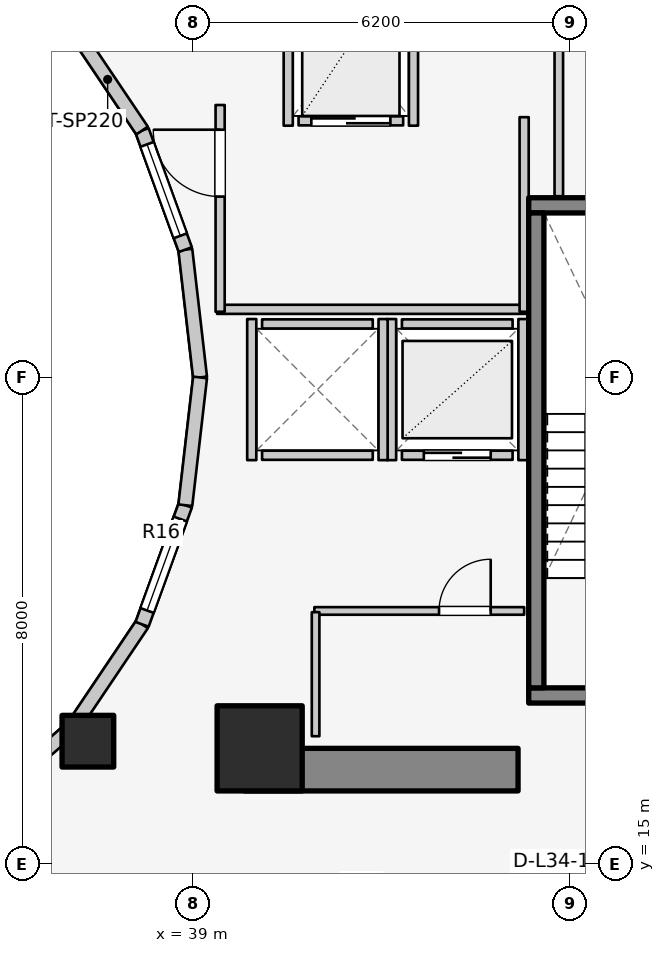
"""IFC4 building model, lengths in metres.
Left out: names, types, materials, properties, quantities, classifications, styles, units other than length and angle.
Written with IfcOpenShell. Run it as: python <this file> out.ifc"""

import sys

from ifc_helpers import new_model, si_unit, direction, frame, frame_2d, origin, origin_2d, place, context, subcontext, project, spatial, rectangle, extrude, element, fill, save


model = new_model("IFC4")
c1 = context("Model", 3, precision=1e-05, world=origin(), true_north=direction((0.0, 1.0)))
c2 = subcontext(c1, "Body", "Model", "MODEL_VIEW")
j1 = project(units=[si_unit("LENGTHUNIT", "METRE"), si_unit("PLANEANGLEUNIT", "RADIAN")], contexts=[c1])
p1 = place(None, origin())
s1 = spatial("IfcSite", under=j1, at=p1, CompositionType="ELEMENT")
p2 = place(p1, origin())
s2 = spatial("IfcBuilding", under=s1, at=p2, CompositionType="ELEMENT")
p3 = place(p2, frame((0.0, 0.0, 113.5)))
s3 = spatial("IfcBuildingStorey", under=s2, at=p3, CompositionType="ELEMENT", Elevation=113.5)
p4 = place(p3, frame((39.85, 16.55, 0.0), z_axis=(0.0, 0.0, 1.0), x_axis=(1.0, 0.0, 0.0)))
e1 = element("IfcWall", 1, at=p4, inside=s3, PredefinedType="SHEAR", context=c2, shape_type="SweptSolid", body=[
    extrude(rectangle(XDim=4.5, YDim=0.7, at=frame_2d((2.25, 0.0))), origin(), (0.0, 0.0, 1.0), 3.1),
])
p5 = place(p3, frame((44.525, 17.77, 0.0), z_axis=(0.0, 0.0, 1.0), x_axis=(1.0, 0.0, 0.0)))
e2 = element("IfcWall", 2, at=p5, inside=s3, PredefinedType="SOLIDWALL", context=c2, shape_type="SweptSolid", body=[
    extrude(rectangle(XDim=3.37, YDim=0.25, at=frame_2d((1.685, 0.0))), origin(), (0.0, 0.0, 1.0), 3.1),
])
p6 = place(p5, frame((1.135, 0.0, 0.0)))
e3 = element("IfcOpeningElement", 3, at=p6, cuts=e2, PredefinedType="OPENING", context=c2, shape_type="SweptSolid", body=[
    extrude(rectangle(XDim=1.1, YDim=2.1, at=frame_2d((0.55, 1.05))), frame((0.0, 0.135, 0.0), z_axis=(0.0, -1.0, 0.0), x_axis=(1.0, 0.0, 0.0)), (0.0, 0.0, 1.0), 0.27),
])
p7 = place(p3, frame((44.525, 25.83, 0.0), z_axis=(0.0, 0.0, 1.0), x_axis=(1.0, 0.0, 0.0)))
e4 = element("IfcWall", 4, at=p7, inside=s3, PredefinedType="SOLIDWALL", context=c2, shape_type="SweptSolid", body=[
    extrude(rectangle(XDim=3.37, YDim=0.25, at=frame_2d((1.685, 0.0))), origin(), (0.0, 0.0, 1.0), 3.1),
])
p8 = place(p3, frame((44.65, 17.895, 0.0), z_axis=(0.0, 0.0, 1.0), x_axis=(0.0, 1.0, 0.0)))
e5 = element("IfcWall", 5, at=p8, inside=s3, PredefinedType="SOLIDWALL", context=c2, shape_type="SweptSolid", body=[
    extrude(rectangle(XDim=7.81, YDim=0.25, at=frame_2d((3.905, 0.0))), origin(), (0.0, 0.0, 1.0), 3.1),
])
p9 = place(p3, frame((40.1, 16.9, 0.0), z_axis=(0.0, 0.0, 1.0), x_axis=(1.0, 0.0, 0.0)))
e6 = element("IfcColumn", 6, at=p9, inside=s3, PredefinedType="COLUMN", context=c2, shape_type="SweptSolid", body=[
    extrude(rectangle(XDim=1.4, YDim=1.4, at=origin_2d()), origin(), (0.0, 0.0, 1.0), 3.1),
])
p10 = place(p3, frame((37.275, 17.018, 0.0), z_axis=(0.0, 0.0, 1.0), x_axis=(1.0, 0.0, 0.0)))
e7 = element("IfcColumn", 7, at=p10, inside=s3, PredefinedType="COLUMN", context=c2, shape_type="SweptSolid", body=[
    extrude(rectangle(XDim=0.85, YDim=0.85, at=origin_2d()), origin(), (0.0, 0.0, 1.0), 3.1),
])
p11 = place(p3, frame((39.12, 23.0, 0.0), z_axis=(0.0, 0.0, 1.0), x_axis=(-0.114711713601, 0.993398823617, 0.0)))
e8 = element("IfcWall", 8, at=p11, inside=s3, PredefinedType="STANDARD", context=c2, shape_type="SweptSolid", body=[
    extrude(rectangle(XDim=2.115, YDim=0.23, at=frame_2d((1.058, 0.0))), origin(), (0.0, 0.0, 1.0), 2.84),
])
p12 = place(p3, frame((38.877, 25.102, 0.0), z_axis=(0.0, 0.0, 1.0), x_axis=(-0.341423187295, 0.93990968033, 0.0)))
e9 = element("IfcWall", 9, at=p12, inside=s3, PredefinedType="STANDARD", context=c2, shape_type="SweptSolid", body=[
    extrude(rectangle(XDim=2.084, YDim=0.23, at=frame_2d((1.042, 0.0))), origin(), (0.0, 0.0, 1.0), 2.84),
])
p13 = place(p12, frame((0.242, 0.0, 0.85)))
e10 = element("IfcOpeningElement", 10, at=p13, cuts=e9, PredefinedType="OPENING", context=c2, shape_type="SweptSolid", body=[
    extrude(rectangle(XDim=1.6, YDim=1.65, at=frame_2d((0.8, 0.825))), frame((0.0, 0.125, 0.0), z_axis=(0.0, -1.0, 0.0), x_axis=(1.0, 0.0, 0.0)), (0.0, 0.0, 1.0), 0.25),
])
p14 = place(p3, frame((38.166, 27.06, 0.0), z_axis=(0.0, 0.0, 1.0), x_axis=(-0.558197800898, 0.829707909492, 0.0)))
e11 = element("IfcWall", 11, at=p14, inside=s3, PredefinedType="STANDARD", context=c2, shape_type="SweptSolid", body=[
    extrude(rectangle(XDim=2.027, YDim=0.23, at=frame_2d((1.013, 0.0))), origin(), (0.0, 0.0, 1.0), 2.16),
])
p15 = place(p3, frame((35.56, 15.968, 0.0), z_axis=(0.0, 0.0, 1.0), x_axis=(0.752576694707, 0.658504607869, 0.0)))
e12 = element("IfcWall", 12, at=p15, inside=s3, PredefinedType="STANDARD", context=c2, shape_type="SweptSolid", body=[
    extrude(rectangle(XDim=1.959, YDim=0.23, at=frame_2d((0.98, 0.0))), origin(), (0.0, 0.0, 1.0), 2.16),
])
p16 = place(p3, frame((37.035, 17.258, 0.0), z_axis=(0.0, 0.0, 1.0), x_axis=(0.558197800898, 0.829707909492, 0.0)))
e13 = element("IfcWall", 13, at=p16, inside=s3, PredefinedType="STANDARD", context=c2, shape_type="SweptSolid", body=[
    extrude(rectangle(XDim=2.027, YDim=0.23, at=frame_2d((1.013, 0.0))), origin(), (0.0, 0.0, 1.0), 2.16),
])
p17 = place(p3, frame((38.166, 18.94, 0.0), z_axis=(0.0, 0.0, 1.0), x_axis=(0.341423187295, 0.93990968033, 0.0)))
e14 = element("IfcWall", 14, at=p17, inside=s3, PredefinedType="STANDARD", context=c2, shape_type="SweptSolid", body=[
    extrude(rectangle(XDim=2.084, YDim=0.23, at=frame_2d((1.042, 0.0))), origin(), (0.0, 0.0, 1.0), 2.84),
])
p18 = place(p17, frame((0.242, 0.0, 0.85)))
e15 = element("IfcOpeningElement", 15, at=p18, cuts=e14, PredefinedType="OPENING", context=c2, shape_type="SweptSolid", body=[
    extrude(rectangle(XDim=1.6, YDim=1.65, at=frame_2d((0.8, 0.825))), frame((0.0, 0.125, 0.0), z_axis=(0.0, -1.0, 0.0), x_axis=(1.0, 0.0, 0.0)), (0.0, 0.0, 1.0), 0.25),
])
p19 = place(p3, frame((38.877, 20.898, 0.0), z_axis=(0.0, 0.0, 1.0), x_axis=(0.114711713601, 0.993398823617, 0.0)))
e16 = element("IfcWall", 16, at=p19, inside=s3, PredefinedType="STANDARD", context=c2, shape_type="SweptSolid", body=[
    extrude(rectangle(XDim=2.115, YDim=0.23, at=frame_2d((1.058, 0.0))), origin(), (0.0, 0.0, 1.0), 2.84),
])
p20 = place(p3, frame((42.44, 21.72, 0.0), z_axis=(0.0, 0.0, 1.0), x_axis=(1.0, 0.0, 0.0)))
e17 = element("IfcWall", 17, at=p20, inside=s3, PredefinedType="SOLIDWALL", context=c2, shape_type="SweptSolid", body=[
    extrude(rectangle(XDim=1.82, YDim=0.15, at=frame_2d((0.91, 0.0))), origin(), (0.0, 0.0, 1.0), 2.855),
])
p21 = place(p20, frame((0.36, 0.0, 0.0)))
e18 = element("IfcOpeningElement", 18, at=p21, cuts=e17, PredefinedType="OPENING", context=c2, shape_type="SweptSolid", body=[
    extrude(rectangle(XDim=1.1, YDim=2.1, at=frame_2d((0.55, 1.05))), frame((0.0, 0.085, 0.0), z_axis=(0.0, -1.0, 0.0), x_axis=(1.0, 0.0, 0.0)), (0.0, 0.0, 1.0), 0.17),
])
p22 = place(p3, frame((42.44, 23.88, 0.0), z_axis=(0.0, 0.0, 1.0), x_axis=(1.0, 0.0, 0.0)))
e19 = element("IfcWall", 19, at=p22, inside=s3, PredefinedType="SOLIDWALL", context=c2, shape_type="SweptSolid", body=[
    extrude(rectangle(XDim=1.82, YDim=0.15, at=frame_2d((0.91, 0.0))), origin(), (0.0, 0.0, 1.0), 2.855),
])
for number, where, z_axis, x_axis in (
    (20, (42.27, 21.64, 0.0), (0.0, 0.0, 1.0), (0.0, 1.0, 0.0)),
    (21, (44.43, 21.64, 0.0), (0.0, 0.0, 1.0), (0.0, 1.0, 0.0)),
):
    element("IfcWall", number, at=place(p3, frame(where, z_axis=z_axis, x_axis=x_axis)), inside=s3, PredefinedType="SOLIDWALL", context=c2, shape_type="SweptSolid", body=[
        extrude(rectangle(XDim=2.32, YDim=0.15, at=frame_2d((1.16, 0.0))), origin(), (0.0, 0.0, 1.0), 2.855),
    ])
for number, where, z_axis, x_axis in (
    (22, (40.14, 21.72, 0.0), (0.0, 0.0, 1.0), (1.0, 0.0, 0.0)),
    (23, (40.14, 23.88, 0.0), (0.0, 0.0, 1.0), (1.0, 0.0, 0.0)),
):
    element("IfcWall", number, at=place(p3, frame(where, z_axis=z_axis, x_axis=x_axis)), inside=s3, PredefinedType="SOLIDWALL", context=c2, shape_type="SweptSolid", body=[
        extrude(rectangle(XDim=1.82, YDim=0.15, at=frame_2d((0.91, 0.0))), origin(), (0.0, 0.0, 1.0), 2.12),
    ])
p23 = place(p3, frame((39.97, 21.64, 0.0), z_axis=(0.0, 0.0, 1.0), x_axis=(0.0, 1.0, 0.0)))
e24 = element("IfcWall", 24, at=p23, inside=s3, PredefinedType="SOLIDWALL", context=c2, shape_type="SweptSolid", body=[
    extrude(rectangle(XDim=2.32, YDim=0.15, at=frame_2d((1.16, 0.0))), origin(), (0.0, 0.0, 1.0), 2.12),
])
p24 = place(p3, frame((42.13, 21.64, 0.0), z_axis=(0.0, 0.0, 1.0), x_axis=(0.0, 1.0, 0.0)))
e25 = element("IfcWall", 25, at=p24, inside=s3, PredefinedType="SOLIDWALL", context=c2, shape_type="SweptSolid", body=[
    extrude(rectangle(XDim=2.32, YDim=0.15, at=frame_2d((1.16, 0.0))), origin(), (0.0, 0.0, 1.0), 2.855),
])
p25 = place(p3, frame((40.74, 27.22, 0.0), z_axis=(0.0, 0.0, 1.0), x_axis=(1.0, 0.0, 0.0)))
e26 = element("IfcWall", 26, at=p25, inside=s3, PredefinedType="SOLIDWALL", context=c2, shape_type="SweptSolid", body=[
    extrude(rectangle(XDim=1.72, YDim=0.15, at=frame_2d((0.86, 0.0))), origin(), (0.0, 0.0, 1.0), 2.855),
])
p26 = place(p25, frame((0.21, 0.0, 0.0)))
e27 = element("IfcOpeningElement", 27, at=p26, cuts=e26, PredefinedType="OPENING", context=c2, shape_type="SweptSolid", body=[
    extrude(rectangle(XDim=1.3, YDim=2.1, at=frame_2d((0.65, 1.05))), frame((0.0, 0.085, 0.0), z_axis=(0.0, -1.0, 0.0), x_axis=(1.0, 0.0, 0.0)), (0.0, 0.0, 1.0), 0.17),
])
for number, where, z_axis, x_axis in (
    (28, (40.57, 27.14, 0.0), (0.0, 0.0, 1.0), (0.0, 1.0, 0.0)),
    (29, (42.63, 27.14, 0.0), (0.0, 0.0, 1.0), (0.0, 1.0, 0.0)),
):
    element("IfcWall", number, at=place(p3, frame(where, z_axis=z_axis, x_axis=x_axis)), inside=s3, PredefinedType="SOLIDWALL", context=c2, shape_type="SweptSolid", body=[
        extrude(rectangle(XDim=2.72, YDim=0.15, at=frame_2d((1.36, 0.0))), origin(), (0.0, 0.0, 1.0), 2.855),
    ])
p27 = place(p3, frame((39.4, 24.12, 0.0), z_axis=(0.0, 0.0, 1.0), x_axis=(1.0, 0.0, 0.0)))
e30 = element("IfcWall", 30, at=p27, inside=s3, PredefinedType="PARTITIONING", context=c2, shape_type="SweptSolid", body=[
    extrude(rectangle(XDim=5.08, YDim=0.15, at=frame_2d((2.54, 0.0))), origin(), (0.0, 0.0, 1.0), 2.12),
])
p28 = place(p3, frame((44.45, 24.08, 0.0), z_axis=(0.0, 0.0, 1.0), x_axis=(0.0, 1.0, 0.0)))
e31 = element("IfcWall", 31, at=p28, inside=s3, PredefinedType="PARTITIONING", context=c2, shape_type="SweptSolid", body=[
    extrude(rectangle(XDim=3.2, YDim=0.15, at=frame_2d((1.6, 0.0))), origin(), (0.0, 0.0, 1.0), 2.855),
])
p29 = place(p3, frame((39.45, 24.08, 0.0), z_axis=(0.0, 0.0, 1.0), x_axis=(0.0, 1.0, 0.0)))
e32 = element("IfcWall", 32, at=p29, inside=s3, PredefinedType="PARTITIONING", context=c2, shape_type="SweptSolid", body=[
    extrude(rectangle(XDim=3.4, YDim=0.15, at=frame_2d((1.7, 0.0))), origin(), (0.0, 0.0, 1.0), 2.855),
])
p30 = place(p29, frame((1.894, 0.0, 0.0)))
e33 = element("IfcOpeningElement", 33, at=p30, cuts=e32, PredefinedType="OPENING", context=c2, shape_type="SweptSolid", body=[
    extrude(rectangle(XDim=1.1, YDim=2.1, at=frame_2d((0.55, 1.05))), frame((0.0, 0.085, 0.0), z_axis=(0.0, -1.0, 0.0), x_axis=(1.0, 0.0, 0.0)), (0.0, 0.0, 1.0), 0.17),
])
p31 = place(p3, frame((41.0, 19.16, 0.0), z_axis=(0.0, 0.0, 1.0), x_axis=(1.0, 0.0, 0.0)))
e34 = element("IfcWall", 34, at=p31, inside=s3, PredefinedType="PARTITIONING", context=c2, shape_type="SweptSolid", body=[
    extrude(rectangle(XDim=3.45, YDim=0.125, at=frame_2d((1.725, 0.0))), origin(), (0.0, 0.0, 1.0), 2.12),
])
p32 = place(p31, frame((2.05, 0.0, 0.0)))
e35 = element("IfcOpeningElement", 35, at=p32, cuts=e34, PredefinedType="OPENING", context=c2, shape_type="SweptSolid", body=[
    extrude(rectangle(XDim=0.85, YDim=2.05, at=frame_2d((0.425, 1.025))), frame((0.0, 0.073, 0.0), z_axis=(0.0, -1.0, 0.0), x_axis=(1.0, 0.0, 0.0)), (0.0, 0.0, 1.0), 0.145),
])
p33 = place(p3, frame((41.02, 17.1, 0.0), z_axis=(0.0, 0.0, 1.0), x_axis=(0.0, 1.0, 0.0)))
e36 = element("IfcWall", 36, at=p33, inside=s3, PredefinedType="PARTITIONING", context=c2, shape_type="SweptSolid", body=[
    extrude(rectangle(XDim=2.04, YDim=0.125, at=frame_2d((1.02, 0.0))), origin(), (0.0, 0.0, 1.0), 2.855),
])
p34 = place(p3, frame((45.02, 25.98, 0.0), z_axis=(0.0, 0.0, 1.0), x_axis=(0.0, 1.0, 0.0)))
e37 = element("IfcWall", 37, at=p34, inside=s3, PredefinedType="PLUMBINGWALL", context=c2, shape_type="SweptSolid", body=[
    extrude(rectangle(XDim=3.88, YDim=0.14, at=frame_2d((1.94, 0.0))), origin(), (0.0, 0.0, 1.0), 2.855),
])
p35 = place(p3, frame((35.55, 15.985, 0.0), z_axis=(0.0, 0.0, 1.0), x_axis=(0.525627246902, -0.850714991824, 0.0)))
e38 = element("IfcWall", 38, at=p35, inside=s3, PredefinedType="PARTITIONING", context=c2, shape_type="SweptSolid", body=[
    extrude(rectangle(XDim=2.901, YDim=0.125, at=frame_2d((1.451, 0.0))), origin(), (0.0, 0.0, 1.0), 2.272),
])
p36 = place(p13, origin())
e39 = element("IfcWindow", 39, at=p36, inside=s3, PartitioningType="SINGLE_PANEL", PredefinedType="WINDOW", context=c2, shape_type="SweptSolid", body=[
    extrude(rectangle(XDim=1.6, YDim=1.65, at=frame_2d((0.8, 0.825))), frame((0.0, 0.03, 0.0), z_axis=(0.0, -1.0, 0.0), x_axis=(1.0, 0.0, 0.0)), (0.0, 0.0, 1.0), 0.06),
])
fill(e10, e39)
p37 = place(p18, origin())
e40 = element("IfcWindow", 40, at=p37, inside=s3, PartitioningType="SINGLE_PANEL", PredefinedType="WINDOW", context=c2, shape_type="SweptSolid", body=[
    extrude(rectangle(XDim=1.6, YDim=1.65, at=frame_2d((0.8, 0.825))), frame((0.0, 0.03, 0.0), z_axis=(0.0, -1.0, 0.0), x_axis=(1.0, 0.0, 0.0)), (0.0, 0.0, 1.0), 0.06),
])
fill(e15, e40)
p38 = place(p21, origin())
e41 = element("IfcDoor", 41, at=p38, inside=s3, OperationType="DOUBLE_DOOR_SLIDING", PredefinedType="DOOR", context=c2, shape_type="SweptSolid", body=[
    extrude(rectangle(XDim=1.1, YDim=2.1, at=frame_2d((0.55, 1.05))), frame((0.0, 0.025, 0.0), z_axis=(0.0, -1.0, 0.0), x_axis=(1.0, 0.0, 0.0)), (0.0, 0.0, 1.0), 0.05),
])
fill(e18, e41)
p39 = place(p26, origin())
e42 = element("IfcDoor", 42, at=p39, inside=s3, OperationType="DOUBLE_DOOR_SLIDING", PredefinedType="DOOR", context=c2, shape_type="SweptSolid", body=[
    extrude(rectangle(XDim=1.3, YDim=2.1, at=frame_2d((0.65, 1.05))), frame((0.0, 0.025, 0.0), z_axis=(0.0, -1.0, 0.0), x_axis=(1.0, 0.0, 0.0)), (0.0, 0.0, 1.0), 0.05),
])
fill(e27, e42)
p40 = place(p30, origin())
e43 = element("IfcDoor", 43, at=p40, inside=s3, OperationType="SINGLE_SWING_RIGHT", PredefinedType="DOOR", context=c2, shape_type="SweptSolid", body=[
    extrude(rectangle(XDim=1.1, YDim=2.1, at=frame_2d((0.55, 1.05))), frame((0.0, 0.025, 0.0), z_axis=(0.0, -1.0, 0.0), x_axis=(1.0, 0.0, 0.0)), (0.0, 0.0, 1.0), 0.05),
])
fill(e33, e43)
p41 = place(p32, origin())
e44 = element("IfcDoor", 44, at=p41, inside=s3, OperationType="SINGLE_SWING_RIGHT", PredefinedType="DOOR", context=c2, shape_type="SweptSolid", body=[
    extrude(rectangle(XDim=0.85, YDim=2.05, at=frame_2d((0.425, 1.025))), frame((0.0, 0.025, 0.0), z_axis=(0.0, -1.0, 0.0), x_axis=(1.0, 0.0, 0.0)), (0.0, 0.0, 1.0), 0.05),
])
fill(e35, e44)
save(model, sys.argv[1])
